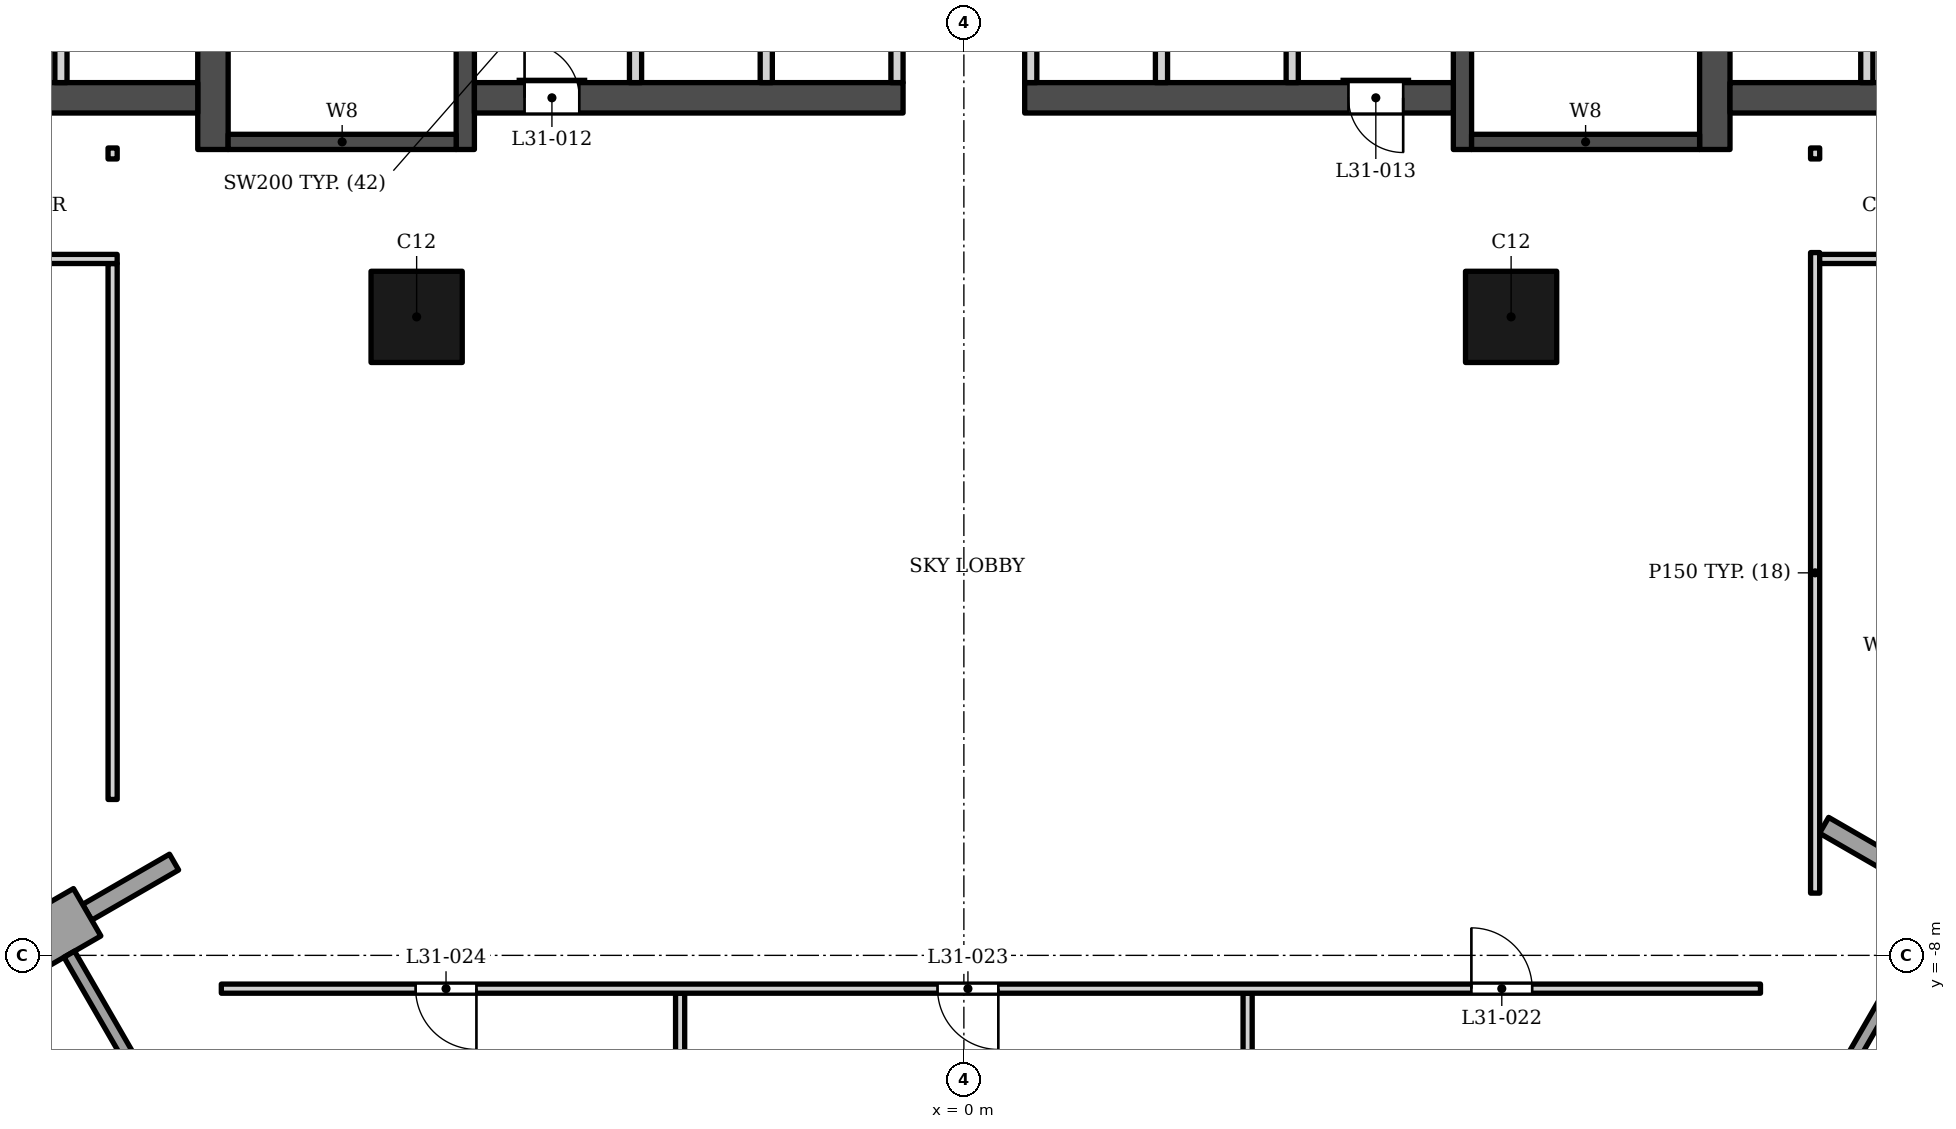
"""IFC4 building model, lengths in metres.
Left out: names, types, materials, properties, quantities, classifications, styles, units other than length and angle.
Written with IfcOpenShell. Run it as: python <this file> out.ifc"""

import sys

from ifc_helpers import new_model, si_unit, direction, frame, frame_2d, origin, origin_2d, place, context, subcontext, project, spatial, rectangle, extrude, element, fill, save


model = new_model("IFC4")
c1 = context("Model", 3, precision=1e-05, world=origin(), true_north=direction((0.0, 1.0)))
c2 = subcontext(c1, "Body", "Model", "MODEL_VIEW")
j1 = project(units=[si_unit("LENGTHUNIT", "METRE"), si_unit("PLANEANGLEUNIT", "RADIAN")], contexts=[c1])
p1 = place(None, origin())
s1 = spatial("IfcSite", under=j1, at=p1, CompositionType="ELEMENT")
p2 = place(p1, origin())
s2 = spatial("IfcBuilding", under=s1, at=p2, CompositionType="ELEMENT")
p3 = place(p2, frame((0.0, 0.0, 132.6)))
s3 = spatial("IfcBuildingStorey", under=s2, at=p3, CompositionType="ELEMENT", Elevation=132.6)
p4 = place(p3, frame((-12.35, 5.253, 0.0), z_axis=(0.0, 0.0, 1.0), x_axis=(0.0, 1.0, 0.0)))
e1 = element("IfcWall", 1, at=p4, inside=s3, PredefinedType="SHEAR", context=c2, shape_type="SweptSolid", body=[
    extrude(rectangle(XDim=13.3, YDim=0.5, at=frame_2d((6.65, 0.0))), origin(), (0.0, 0.0, 1.0), 7.0),
])
p5 = place(p3, frame((-8.2, 5.253, 0.0), z_axis=(0.0, 0.0, 1.0), x_axis=(0.0, 1.0, 0.0)))
e2 = element("IfcWall", 2, at=p5, inside=s3, PredefinedType="SHEAR", context=c2, shape_type="SweptSolid", body=[
    extrude(rectangle(XDim=13.3, YDim=0.3, at=frame_2d((6.65, 0.0))), origin(), (0.0, 0.0, 1.0), 7.0),
])
p6 = place(p5, frame((7.1, 0.0, 0.0)))
e3 = element("IfcOpeningElement", 3, at=p6, cuts=e2, PredefinedType="OPENING", context=c2, shape_type="SweptSolid", body=[
    extrude(rectangle(XDim=1.4, YDim=2.1, at=frame_2d((0.7, 1.05))), frame((0.0, 0.16, 0.0), z_axis=(0.0, -1.0, 0.0), x_axis=(1.0, 0.0, 0.0)), (0.0, 0.0, 1.0), 0.32),
])
p7 = place(p5, frame((5.05, 0.0, 0.0)))
e4 = element("IfcOpeningElement", 4, at=p7, cuts=e2, PredefinedType="OPENING", context=c2, shape_type="SweptSolid", body=[
    extrude(rectangle(XDim=1.4, YDim=2.1, at=frame_2d((0.7, 1.05))), frame((0.0, 0.16, 0.0), z_axis=(0.0, -1.0, 0.0), x_axis=(1.0, 0.0, 0.0)), (0.0, 0.0, 1.0), 0.32),
])
p8 = place(p3, frame((-12.1, 5.378, 0.0), z_axis=(0.0, 0.0, 1.0), x_axis=(1.0, 0.0, 0.0)))
e5 = element("IfcWall", 5, at=p8, inside=s3, PredefinedType="SHEAR", context=c2, shape_type="SweptSolid", body=[
    extrude(rectangle(XDim=3.75, YDim=0.25, at=frame_2d((1.875, 0.0))), origin(), (0.0, 0.0, 1.0), 7.0),
])
p9 = place(p3, frame((12.35, 5.253, 0.0), z_axis=(0.0, 0.0, 1.0), x_axis=(0.0, 1.0, 0.0)))
e6 = element("IfcWall", 6, at=p9, inside=s3, PredefinedType="SHEAR", context=c2, shape_type="SweptSolid", body=[
    extrude(rectangle(XDim=13.3, YDim=0.5, at=frame_2d((6.65, 0.0))), origin(), (0.0, 0.0, 1.0), 7.0),
])
p10 = place(p3, frame((8.2, 5.253, 0.0), z_axis=(0.0, 0.0, 1.0), x_axis=(0.0, 1.0, 0.0)))
e7 = element("IfcWall", 7, at=p10, inside=s3, PredefinedType="SHEAR", context=c2, shape_type="SweptSolid", body=[
    extrude(rectangle(XDim=13.3, YDim=0.3, at=frame_2d((6.65, 0.0))), origin(), (0.0, 0.0, 1.0), 7.0),
])
p11 = place(p10, frame((7.1, 0.0, 0.0)))
e8 = element("IfcOpeningElement", 8, at=p11, cuts=e7, PredefinedType="OPENING", context=c2, shape_type="SweptSolid", body=[
    extrude(rectangle(XDim=1.4, YDim=2.1, at=frame_2d((0.7, 1.05))), frame((0.0, 0.16, 0.0), z_axis=(0.0, -1.0, 0.0), x_axis=(1.0, 0.0, 0.0)), (0.0, 0.0, 1.0), 0.32),
])
p12 = place(p10, frame((5.05, 0.0, 0.0)))
e9 = element("IfcOpeningElement", 9, at=p12, cuts=e7, PredefinedType="OPENING", context=c2, shape_type="SweptSolid", body=[
    extrude(rectangle(XDim=1.4, YDim=2.1, at=frame_2d((0.7, 1.05))), frame((0.0, 0.16, 0.0), z_axis=(0.0, -1.0, 0.0), x_axis=(1.0, 0.0, 0.0)), (0.0, 0.0, 1.0), 0.32),
])
p13 = place(p3, frame((8.35, 5.378, 0.0), z_axis=(0.0, 0.0, 1.0), x_axis=(1.0, 0.0, 0.0)))
e10 = element("IfcWall", 10, at=p13, inside=s3, PredefinedType="SHEAR", context=c2, shape_type="SweptSolid", body=[
    extrude(rectangle(XDim=3.75, YDim=0.25, at=frame_2d((1.875, 0.0))), origin(), (0.0, 0.0, 1.0), 7.0),
])
p14 = place(p3, frame((-8.05, 6.103, 0.0), z_axis=(0.0, 0.0, 1.0), x_axis=(1.0, 0.0, 0.0)))
e11 = element("IfcWall", 11, at=p14, inside=s3, PredefinedType="SHEAR", context=c2, shape_type="SweptSolid", body=[
    extrude(rectangle(XDim=7.05, YDim=0.5, at=frame_2d((3.525, 0.0))), origin(), (0.0, 0.0, 1.0), 7.0),
])
p15 = place(p14, frame((0.825, 0.0, 0.0)))
e12 = element("IfcOpeningElement", 12, at=p15, cuts=e11, PredefinedType="OPENING", context=c2, shape_type="SweptSolid", body=[
    extrude(rectangle(XDim=0.9, YDim=2.1, at=frame_2d((0.45, 1.05))), frame((0.0, 0.26, 0.0), z_axis=(0.0, -1.0, 0.0), x_axis=(1.0, 0.0, 0.0)), (0.0, 0.0, 1.0), 0.52),
])
p16 = place(p3, frame((1.0, 6.103, 0.0), z_axis=(0.0, 0.0, 1.0), x_axis=(1.0, 0.0, 0.0)))
e13 = element("IfcWall", 13, at=p16, inside=s3, PredefinedType="SHEAR", context=c2, shape_type="SweptSolid", body=[
    extrude(rectangle(XDim=7.05, YDim=0.5, at=frame_2d((3.525, 0.0))), origin(), (0.0, 0.0, 1.0), 7.0),
])
p17 = place(p16, frame((5.325, 0.0, 0.0)))
e14 = element("IfcOpeningElement", 14, at=p17, cuts=e13, PredefinedType="OPENING", context=c2, shape_type="SweptSolid", body=[
    extrude(rectangle(XDim=0.9, YDim=2.1, at=frame_2d((0.45, 1.05))), frame((0.0, 0.26, 0.0), z_axis=(0.0, -1.0, 0.0), x_axis=(1.0, 0.0, 0.0)), (0.0, 0.0, 1.0), 0.52),
])
for number, where, z_axis, x_axis in (
    (15, (-12.6, 6.103, 0.0), (0.0, 0.0, 1.0), (-1.0, 0.0, 0.0)),
    (16, (12.6, 6.103, 0.0), (0.0, 0.0, 1.0), (1.0, 0.0, 0.0)),
):
    element("IfcWall", number, at=place(p3, frame(where, z_axis=z_axis, x_axis=x_axis)), inside=s3, PredefinedType="SHEAR", context=c2, shape_type="SweptSolid", body=[
        extrude(rectangle(XDim=4.3, YDim=0.5, at=frame_2d((2.15, 0.0))), origin(), (0.0, 0.0, 1.0), 7.0),
    ])
for number, where, z_axis, x_axis in (
    (17, (-9.0, 2.5, 0.0), (0.0, 0.0, 1.0), (1.0, 0.0, 0.0)),
    (18, (9.0, 2.5, 0.0), (0.0, 0.0, 1.0), (1.0, 0.0, 0.0)),
):
    element("IfcColumn", number, at=place(p3, frame(where, z_axis=z_axis, x_axis=x_axis)), inside=s3, PredefinedType="COLUMN", context=c2, shape_type="SweptSolid", body=[
        extrude(rectangle(XDim=1.5, YDim=1.5, at=origin_2d()), origin(), (0.0, 0.0, 1.0), 7.0),
    ])
p18 = place(p3, frame((-15.458, -7.891, 0.0), z_axis=(0.0, 0.0, 1.0), x_axis=(0.866043267704, 0.499969057507, 0.0)))
e19 = element("IfcWall", 19, at=p18, inside=s3, PredefinedType="SOLIDWALL", context=c2, shape_type="SweptSolid", body=[
    extrude(rectangle(XDim=1.2, YDim=0.9, at=frame_2d((0.6, 0.0))), origin(), (0.0, 0.0, 1.0), 6.0),
])
p19 = place(p3, frame((-14.419, -7.291, 0.0), z_axis=(0.0, 0.0, 1.0), x_axis=(0.865976140824, 0.500085316245, 0.0)))
e20 = element("IfcWall", 20, at=p19, inside=s3, PredefinedType="SOLIDWALL", context=c2, shape_type="SweptSolid", body=[
    extrude(rectangle(XDim=1.65, YDim=0.3, at=frame_2d((0.825, 0.0))), origin(), (0.0, 0.0, 1.0), 5.854),
])
p20 = place(p3, frame((-14.713, -7.981, 0.0), z_axis=(0.0, 0.0, 1.0), x_axis=(0.500012057535, -0.866018442252, 0.0)))
e21 = element("IfcWall", 21, at=p20, inside=s3, PredefinedType="SOLIDWALL", context=c2, shape_type="SweptSolid", body=[
    extrude(rectangle(XDim=3.6, YDim=0.2, at=frame_2d((1.8, 0.0))), origin(), (0.0, 0.0, 1.0), 6.0),
])
p21 = place(p3, frame((15.637, -6.721, 0.0), z_axis=(0.0, 0.0, 1.0), x_axis=(-0.866024871741, 0.500000921525, 0.0)))
e22 = element("IfcWall", 22, at=p21, inside=s3, PredefinedType="SOLIDWALL", context=c2, shape_type="SweptSolid", body=[
    extrude(rectangle(XDim=1.72, YDim=0.3, at=frame_2d((0.86, 0.0))), origin(), (0.0, 0.0, 1.0), 6.0),
])
p22 = place(p3, frame((14.132, -10.528, 0.0), z_axis=(0.0, 0.0, 1.0), x_axis=(0.500012057535, 0.866018442252, 0.0)))
e23 = element("IfcWall", 23, at=p22, inside=s3, PredefinedType="SOLIDWALL", context=c2, shape_type="SweptSolid", body=[
    extrude(rectangle(XDim=3.6, YDim=0.2, at=frame_2d((1.8, 0.0))), origin(), (0.0, 0.0, 1.0), 6.0),
])
for number, where, z_axis, x_axis in (
    (24, (-14.85, 6.353, 0.0), (0.0, 0.0, 1.0), (0.0, 1.0, 0.0)),
    (25, (-5.4, 6.353, 0.0), (0.0, 0.0, 1.0), (0.0, 1.0, 0.0)),
    (26, (-3.25, 6.353, 0.0), (0.0, 0.0, 1.0), (0.0, 1.0, 0.0)),
    (27, (-1.1, 6.353, 0.0), (0.0, 0.0, 1.0), (0.0, 1.0, 0.0)),
    (28, (1.1, 6.353, 0.0), (0.0, 0.0, 1.0), (0.0, 1.0, 0.0)),
    (29, (3.25, 6.353, 0.0), (0.0, 0.0, 1.0), (0.0, 1.0, 0.0)),
    (30, (5.4, 6.353, 0.0), (0.0, 0.0, 1.0), (0.0, 1.0, 0.0)),
    (31, (14.85, 6.353, 0.0), (0.0, 0.0, 1.0), (0.0, 1.0, 0.0)),
):
    element("IfcWall", number, at=place(p3, frame(where, z_axis=z_axis, x_axis=x_axis)), inside=s3, PredefinedType="SOLIDWALL", context=c2, shape_type="SweptSolid", body=[
        extrude(rectangle(XDim=2.5, YDim=0.2, at=frame_2d((1.25, 0.0))), origin(), (0.0, 0.0, 1.0), 6.7),
    ])
p23 = place(p3, frame((4.667, -23.142, 0.0), z_axis=(0.0, 0.0, 1.0), x_axis=(0.0, 1.0, 0.0)))
e32 = element("IfcWall", 32, at=p23, inside=s3, PredefinedType="PARTITIONING", context=c2, shape_type="SweptSolid", body=[
    extrude(rectangle(XDim=14.52, YDim=0.15, at=frame_2d((7.26, 0.0))), origin(), (0.0, 0.0, 1.0), 5.712),
])
p24 = place(p3, frame((-4.667, -21.602, 0.0), z_axis=(0.0, 0.0, 1.0), x_axis=(0.0, 1.0, 0.0)))
e33 = element("IfcWall", 33, at=p24, inside=s3, PredefinedType="PARTITIONING", context=c2, shape_type="SweptSolid", body=[
    extrude(rectangle(XDim=12.979, YDim=0.15, at=frame_2d((6.49, 0.0))), origin(), (0.0, 0.0, 1.0), 5.712),
])
p25 = place(p3, frame((-12.212, -8.547, 0.0), z_axis=(0.0, 0.0, 1.0), x_axis=(1.0, 0.0, 0.0)))
e34 = element("IfcWall", 34, at=p25, inside=s3, PredefinedType="PARTITIONING", context=c2, shape_type="SweptSolid", body=[
    extrude(rectangle(XDim=25.313, YDim=0.15, at=frame_2d((12.657, 0.0))), origin(), (0.0, 0.0, 1.0), 5.712),
])
p26 = place(p25, frame((20.559, 0.0, 0.0)))
e35 = element("IfcOpeningElement", 35, at=p26, cuts=e34, PredefinedType="OPENING", context=c2, shape_type="SweptSolid", body=[
    extrude(rectangle(XDim=1.0, YDim=2.1, at=frame_2d((0.5, 1.05))), frame((0.0, 0.085, 0.0), z_axis=(0.0, -1.0, 0.0), x_axis=(1.0, 0.0, 0.0)), (0.0, 0.0, 1.0), 0.17),
])
p27 = place(p25, frame((11.779, 0.0, 0.0)))
e36 = element("IfcOpeningElement", 36, at=p27, cuts=e34, PredefinedType="OPENING", context=c2, shape_type="SweptSolid", body=[
    extrude(rectangle(XDim=1.0, YDim=2.1, at=frame_2d((0.5, 1.05))), frame((0.0, 0.085, 0.0), z_axis=(0.0, -1.0, 0.0), x_axis=(1.0, 0.0, 0.0)), (0.0, 0.0, 1.0), 0.17),
])
p28 = place(p25, frame((3.196, 0.0, 0.0)))
e37 = element("IfcOpeningElement", 37, at=p28, cuts=e34, PredefinedType="OPENING", context=c2, shape_type="SweptSolid", body=[
    extrude(rectangle(XDim=1.0, YDim=2.1, at=frame_2d((0.5, 1.05))), frame((0.0, 0.085, 0.0), z_axis=(0.0, -1.0, 0.0), x_axis=(1.0, 0.0, 0.0)), (0.0, 0.0, 1.0), 0.17),
])
p29 = place(p3, frame((14.0, -6.976, 0.0), z_axis=(0.0, 0.0, 1.0), x_axis=(0.0, 1.0, 0.0)))
e38 = element("IfcWall", 38, at=p29, inside=s3, PredefinedType="PARTITIONING", context=c2, shape_type="SweptSolid", body=[
    extrude(rectangle(XDim=10.534, YDim=0.15, at=frame_2d((5.267, 0.0))), origin(), (0.0, 0.0, 1.0), 6.7),
])
p30 = place(p3, frame((-14.0, -5.436, 0.0), z_axis=(0.0, 0.0, 1.0), x_axis=(0.0, 1.0, 0.0)))
e39 = element("IfcWall", 39, at=p30, inside=s3, PredefinedType="PARTITIONING", context=c2, shape_type="SweptSolid", body=[
    extrude(rectangle(XDim=8.814, YDim=0.15, at=frame_2d((4.407, 0.0))), origin(), (0.0, 0.0, 1.0), 6.7),
])
p31 = place(p3, frame((-19.14, 3.453, 0.0), z_axis=(0.0, 0.0, 1.0), x_axis=(1.0, 0.0, 0.0)))
e40 = element("IfcWall", 40, at=p31, inside=s3, PredefinedType="PARTITIONING", context=c2, shape_type="SweptSolid", body=[
    extrude(rectangle(XDim=5.215, YDim=0.15, at=frame_2d((2.608, 0.0))), origin(), (0.0, 0.0, 1.0), 6.302),
])
p32 = place(p3, frame((14.075, 3.453, 0.0), z_axis=(0.0, 0.0, 1.0), x_axis=(1.0, 0.0, 0.0)))
e41 = element("IfcWall", 41, at=p32, inside=s3, PredefinedType="PARTITIONING", context=c2, shape_type="SweptSolid", body=[
    extrude(rectangle(XDim=3.25, YDim=0.15, at=frame_2d((1.625, 0.0))), origin(), (0.0, 0.0, 1.0), 6.7),
])
for number, where, z_axis, x_axis in (
    (42, (-14.0, 5.098, 0.0), (0.0, 0.0, 1.0), (0.0, 1.0, 0.0)),
    (43, (14.0, 5.098, 0.0), (0.0, 0.0, 1.0), (0.0, 1.0, 0.0)),
):
    element("IfcWall", number, at=place(p3, frame(where, z_axis=z_axis, x_axis=x_axis)), inside=s3, PredefinedType="PARTITIONING", context=c2, shape_type="SweptSolid", body=[
        extrude(rectangle(XDim=0.18, YDim=0.15, at=frame_2d((0.09, 0.0))), origin(), (0.0, 0.0, 1.0), 6.7),
    ])
p33 = place(p15, origin())
e44 = element("IfcDoor", 44, at=p33, inside=s3, OperationType="SINGLE_SWING_LEFT", PredefinedType="DOOR", context=c2, shape_type="SweptSolid", body=[
    extrude(rectangle(XDim=0.9, YDim=2.1, at=frame_2d((0.45, 1.05))), frame((0.0, 0.025, 0.0), z_axis=(0.0, -1.0, 0.0), x_axis=(1.0, 0.0, 0.0)), (0.0, 0.0, 1.0), 0.05),
])
fill(e12, e44)
p34 = place(p17, origin())
e45 = element("IfcDoor", 45, at=p34, inside=s3, OperationType="SINGLE_SWING_RIGHT", PredefinedType="DOOR", context=c2, shape_type="SweptSolid", body=[
    extrude(rectangle(XDim=0.9, YDim=2.1, at=frame_2d((0.45, 1.05))), frame((0.0, 0.025, 0.0), z_axis=(0.0, -1.0, 0.0), x_axis=(1.0, 0.0, 0.0)), (0.0, 0.0, 1.0), 0.05),
])
fill(e14, e45)
p35 = place(p26, origin())
e46 = element("IfcDoor", 46, at=p35, inside=s3, OperationType="SINGLE_SWING_LEFT", PredefinedType="DOOR", context=c2, shape_type="SweptSolid", body=[
    extrude(rectangle(XDim=1.0, YDim=2.1, at=frame_2d((0.5, 1.05))), frame((0.0, 0.025, 0.0), z_axis=(0.0, -1.0, 0.0), x_axis=(1.0, 0.0, 0.0)), (0.0, 0.0, 1.0), 0.05),
])
fill(e35, e46)
p36 = place(p27, origin())
e47 = element("IfcDoor", 47, at=p36, inside=s3, OperationType="SINGLE_SWING_RIGHT", PredefinedType="DOOR", context=c2, shape_type="SweptSolid", body=[
    extrude(rectangle(XDim=1.0, YDim=2.1, at=frame_2d((0.5, 1.05))), frame((0.0, 0.025, 0.0), z_axis=(0.0, -1.0, 0.0), x_axis=(1.0, 0.0, 0.0)), (0.0, 0.0, 1.0), 0.05),
])
fill(e36, e47)
p37 = place(p28, origin())
e48 = element("IfcDoor", 48, at=p37, inside=s3, OperationType="SINGLE_SWING_RIGHT", PredefinedType="DOOR", context=c2, shape_type="SweptSolid", body=[
    extrude(rectangle(XDim=1.0, YDim=2.1, at=frame_2d((0.5, 1.05))), frame((0.0, 0.025, 0.0), z_axis=(0.0, -1.0, 0.0), x_axis=(1.0, 0.0, 0.0)), (0.0, 0.0, 1.0), 0.05),
])
fill(e37, e48)
save(model, sys.argv[1])
